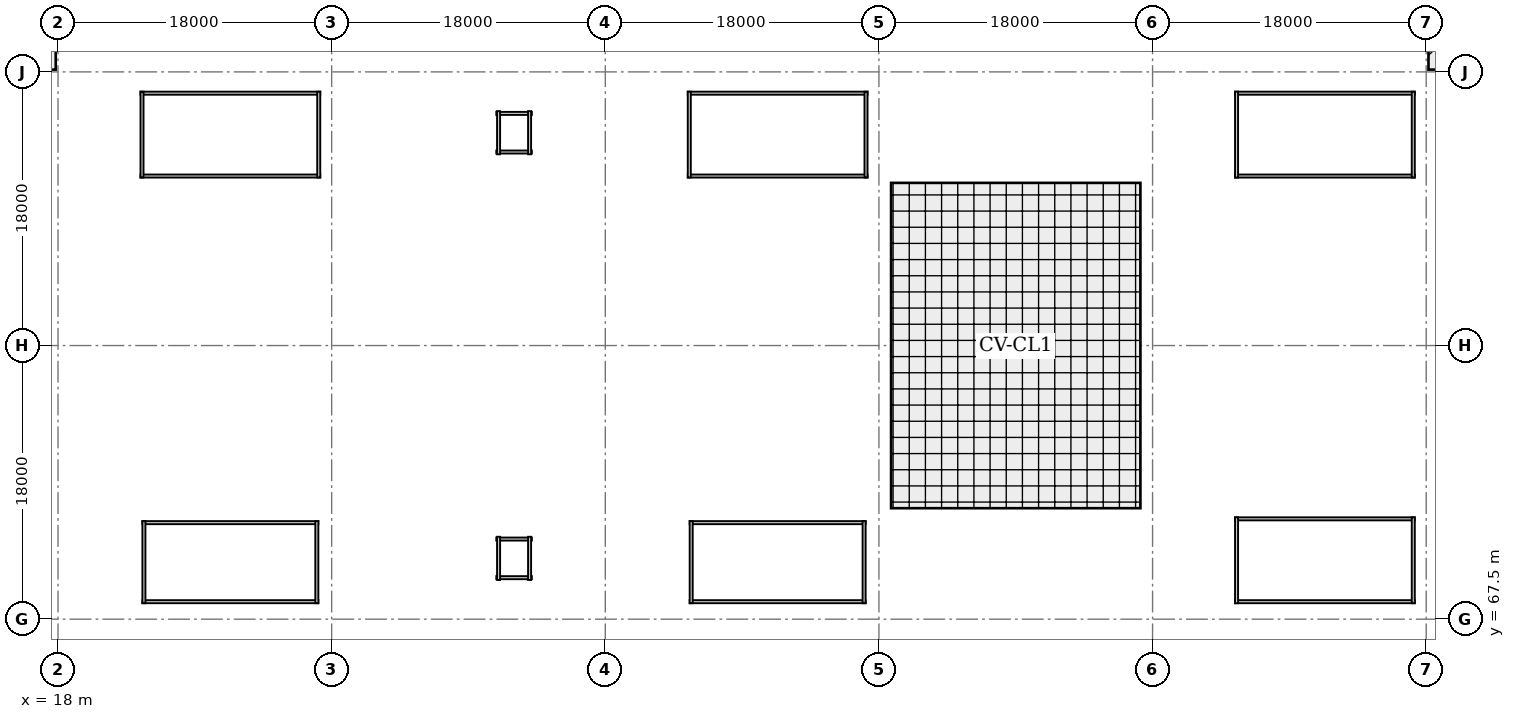
"""IFC4 building model, lengths in metres.
Left out: names, types, materials, properties, quantities, classifications, styles, units other than length and angle.
Written with IfcOpenShell. Run it as: python <this file> out.ifc"""

import sys

from ifc_helpers import new_model, si_unit, direction, frame, frame_2d, origin, origin_2d, place, context, subcontext, project, spatial, rectangle, i_section, extrude, element, fill, save


model = new_model("IFC4")
c1 = context("Model", 3, precision=1e-05, world=origin(), true_north=direction((0.0, 1.0)))
c2 = subcontext(c1, "Body", "Model", "MODEL_VIEW")
j1 = project(units=[si_unit("LENGTHUNIT", "METRE"), si_unit("PLANEANGLEUNIT", "RADIAN")], contexts=[c1])
p1 = place(None, origin())
s1 = spatial("IfcSite", under=j1, at=p1, CompositionType="ELEMENT")
p2 = place(p1, origin())
s2 = spatial("IfcBuilding", under=s1, at=p2, CompositionType="ELEMENT")
p3 = place(p2, frame((0.0, 0.0, 6.6)))
s3 = spatial("IfcBuildingStorey", under=s2, at=p3, CompositionType="ELEMENT", Elevation=6.6)
for number, where, z_axis, x_axis in (
    (1, (18.0, 67.5, 0.0), (0.0, 0.0, 1.0), (1.0, 0.0, 0.0)),
    (2, (18.0, 103.5, 0.0), (0.0, 0.0, 1.0), (1.0, 0.0, 0.0)),
    (3, (36.0, 67.5, 0.0), (0.0, 0.0, 1.0), (1.0, 0.0, 0.0)),
    (4, (36.0, 103.5, 0.0), (0.0, 0.0, 1.0), (1.0, 0.0, 0.0)),
    (5, (54.0, 67.5, 0.0), (0.0, 0.0, 1.0), (1.0, 0.0, 0.0)),
    (6, (54.0, 103.5, 0.0), (0.0, 0.0, 1.0), (1.0, 0.0, 0.0)),
    (7, (72.0, 67.5, 0.0), (0.0, 0.0, 1.0), (1.0, 0.0, 0.0)),
    (8, (72.0, 103.5, 0.0), (0.0, 0.0, 1.0), (1.0, 0.0, 0.0)),
    (9, (90.0, 67.5, 0.0), (0.0, 0.0, 1.0), (1.0, 0.0, 0.0)),
    (10, (90.0, 103.5, 0.0), (0.0, 0.0, 1.0), (1.0, 0.0, 0.0)),
    (11, (108.0, 67.5, 0.0), (0.0, 0.0, 1.0), (1.0, 0.0, 0.0)),
    (12, (108.0, 103.5, 0.0), (0.0, 0.0, 1.0), (1.0, 0.0, 0.0)),
):
    element("IfcColumn", number, at=place(p3, frame(where, z_axis=z_axis, x_axis=x_axis)), inside=s3, PredefinedType="COLUMN", context=c2, shape_type="SweptSolid", body=[
        extrude(rectangle(XDim=1.4, YDim=1.1, at=origin_2d()), origin(), (0.0, 0.0, 1.0), 4.2),
    ])
for number, where, z_axis, x_axis in (
    (13, (18.0, 76.5, -0.68), (0.0, 0.0, 1.0), (1.0, 0.0, 0.0)),
    (14, (18.0, 85.5, -0.68), (0.0, 0.0, 1.0), (1.0, 0.0, 0.0)),
    (15, (18.0, 94.5, -0.68), (0.0, 0.0, 1.0), (1.0, 0.0, 0.0)),
    (16, (36.0, 76.5, -0.68), (0.0, 0.0, 1.0), (1.0, 0.0, 0.0)),
    (17, (36.0, 85.5, -0.68), (0.0, 0.0, 1.0), (1.0, 0.0, 0.0)),
    (18, (36.0, 94.5, -0.68), (0.0, 0.0, 1.0), (1.0, 0.0, 0.0)),
    (19, (54.0, 76.5, -0.68), (0.0, 0.0, 1.0), (1.0, 0.0, 0.0)),
    (20, (54.0, 85.5, -0.68), (0.0, 0.0, 1.0), (1.0, 0.0, 0.0)),
    (21, (54.0, 94.5, -0.68), (0.0, 0.0, 1.0), (1.0, 0.0, 0.0)),
    (22, (72.0, 76.5, -0.68), (0.0, 0.0, 1.0), (1.0, 0.0, 0.0)),
    (23, (72.0, 85.5, -0.68), (0.0, 0.0, 1.0), (1.0, 0.0, 0.0)),
    (24, (72.0, 94.5, -0.68), (0.0, 0.0, 1.0), (1.0, 0.0, 0.0)),
    (25, (90.0, 76.5, -0.68), (0.0, 0.0, 1.0), (1.0, 0.0, 0.0)),
    (26, (90.0, 85.5, -0.68), (0.0, 0.0, 1.0), (1.0, 0.0, 0.0)),
    (27, (90.0, 94.5, -0.68), (0.0, 0.0, 1.0), (1.0, 0.0, 0.0)),
    (28, (108.0, 76.5, -0.68), (0.0, 0.0, 1.0), (1.0, 0.0, 0.0)),
    (29, (108.0, 85.5, -0.68), (0.0, 0.0, 1.0), (1.0, 0.0, 0.0)),
    (30, (108.0, 94.5, -0.68), (0.0, 0.0, 1.0), (1.0, 0.0, 0.0)),
):
    element("IfcColumn", number, at=place(p3, frame(where, z_axis=z_axis, x_axis=x_axis)), inside=s3, PredefinedType="COLUMN", context=c2, shape_type="SweptSolid", body=[
        extrude(i_section(OverallWidth=0.4, OverallDepth=0.408, WebThickness=0.021, FlangeThickness=0.021, FilletRadius=0.022, at=origin_2d()), origin(), (0.0, 0.0, 1.0), 4.03),
    ])
for number, where, z_axis, x_axis in (
    (31, (23.55, 68.65, 0.0), (0.0, 0.0, 1.0), (1.0, 0.0, 0.0)),
    (32, (35.125, 73.85, 0.0), (0.0, 0.0, 1.0), (-1.0, 0.0, 0.0)),
):
    element("IfcWall", number, at=place(p3, frame(where, z_axis=z_axis, x_axis=x_axis)), inside=s3, PredefinedType="SOLIDWALL", context=c2, shape_type="SweptSolid", body=[
        extrude(rectangle(XDim=11.575, YDim=0.2, at=frame_2d((5.788, 0.0))), origin(), (0.0, 0.0, 1.0), 2.45),
    ])
p4 = place(p3, frame((35.025, 68.55, 0.0), z_axis=(0.0, 0.0, 1.0), x_axis=(0.0, 1.0, 0.0)))
e33 = element("IfcWall", 33, at=p4, inside=s3, PredefinedType="SOLIDWALL", context=c2, shape_type="SweptSolid", body=[
    extrude(rectangle(XDim=5.4, YDim=0.2, at=frame_2d((2.7, 0.0))), origin(), (0.0, 0.0, 1.0), 2.45),
])
p5 = place(p3, frame((23.65, 73.95, 0.0), z_axis=(0.0, 0.0, 1.0), x_axis=(0.0, -1.0, 0.0)))
e34 = element("IfcWall", 34, at=p5, inside=s3, PredefinedType="SOLIDWALL", context=c2, shape_type="SweptSolid", body=[
    extrude(rectangle(XDim=5.4, YDim=0.2, at=frame_2d((2.7, 0.0))), origin(), (0.0, 0.0, 1.0), 2.45),
])
p6 = place(p5, frame((1.9, 0.0, 0.0)))
e35 = element("IfcOpeningElement", 35, at=p6, cuts=e34, PredefinedType="OPENING", context=c2, shape_type="SweptSolid", body=[
    extrude(rectangle(XDim=1.6, YDim=2.15, at=frame_2d((0.8, 1.075))), frame((0.0, 0.11, 0.0), z_axis=(0.0, -1.0, 0.0), x_axis=(1.0, 0.0, 0.0)), (0.0, 0.0, 1.0), 0.22),
])
for number, where, z_axis, x_axis in (
    (36, (59.55, 68.65, 0.0), (0.0, 0.0, 1.0), (1.0, 0.0, 0.0)),
    (37, (71.125, 73.85, 0.0), (0.0, 0.0, 1.0), (-1.0, 0.0, 0.0)),
):
    element("IfcWall", number, at=place(p3, frame(where, z_axis=z_axis, x_axis=x_axis)), inside=s3, PredefinedType="SOLIDWALL", context=c2, shape_type="SweptSolid", body=[
        extrude(rectangle(XDim=11.575, YDim=0.2, at=frame_2d((5.788, 0.0))), origin(), (0.0, 0.0, 1.0), 2.45),
    ])
p7 = place(p3, frame((71.025, 68.55, 0.0), z_axis=(0.0, 0.0, 1.0), x_axis=(0.0, 1.0, 0.0)))
e38 = element("IfcWall", 38, at=p7, inside=s3, PredefinedType="SOLIDWALL", context=c2, shape_type="SweptSolid", body=[
    extrude(rectangle(XDim=5.4, YDim=0.2, at=frame_2d((2.7, 0.0))), origin(), (0.0, 0.0, 1.0), 2.45),
])
p8 = place(p3, frame((59.65, 73.95, 0.0), z_axis=(0.0, 0.0, 1.0), x_axis=(0.0, -1.0, 0.0)))
e39 = element("IfcWall", 39, at=p8, inside=s3, PredefinedType="SOLIDWALL", context=c2, shape_type="SweptSolid", body=[
    extrude(rectangle(XDim=5.4, YDim=0.2, at=frame_2d((2.7, 0.0))), origin(), (0.0, 0.0, 1.0), 2.45),
])
p9 = place(p8, frame((1.9, 0.0, 0.0)))
e40 = element("IfcOpeningElement", 40, at=p9, cuts=e39, PredefinedType="OPENING", context=c2, shape_type="SweptSolid", body=[
    extrude(rectangle(XDim=1.6, YDim=2.15, at=frame_2d((0.8, 1.075))), frame((0.0, 0.11, 0.0), z_axis=(0.0, -1.0, 0.0), x_axis=(1.0, 0.0, 0.0)), (0.0, 0.0, 1.0), 0.22),
])
for number, where, z_axis, x_axis in (
    (41, (95.425, 68.65, 0.0), (0.0, 0.0, 1.0), (1.0, 0.0, 0.0)),
    (42, (107.25, 74.1, 0.0), (0.0, 0.0, 1.0), (-1.0, 0.0, 0.0)),
):
    element("IfcWall", number, at=place(p3, frame(where, z_axis=z_axis, x_axis=x_axis)), inside=s3, PredefinedType="SOLIDWALL", context=c2, shape_type="SweptSolid", body=[
        extrude(rectangle(XDim=11.825, YDim=0.2, at=frame_2d((5.913, 0.0))), origin(), (0.0, 0.0, 1.0), 2.45),
    ])
p10 = place(p3, frame((107.15, 68.55, 0.0), z_axis=(0.0, 0.0, 1.0), x_axis=(0.0, 1.0, 0.0)))
e43 = element("IfcWall", 43, at=p10, inside=s3, PredefinedType="SOLIDWALL", context=c2, shape_type="SweptSolid", body=[
    extrude(rectangle(XDim=5.65, YDim=0.2, at=frame_2d((2.825, 0.0))), origin(), (0.0, 0.0, 1.0), 2.45),
])
p11 = place(p3, frame((95.525, 74.2, 0.0), z_axis=(0.0, 0.0, 1.0), x_axis=(0.0, -1.0, 0.0)))
e44 = element("IfcWall", 44, at=p11, inside=s3, PredefinedType="SOLIDWALL", context=c2, shape_type="SweptSolid", body=[
    extrude(rectangle(XDim=5.65, YDim=0.2, at=frame_2d((2.825, 0.0))), origin(), (0.0, 0.0, 1.0), 2.45),
])
p12 = place(p11, frame((2.025, 0.0, 0.0)))
e45 = element("IfcOpeningElement", 45, at=p12, cuts=e44, PredefinedType="OPENING", context=c2, shape_type="SweptSolid", body=[
    extrude(rectangle(XDim=1.6, YDim=2.15, at=frame_2d((0.8, 1.075))), frame((0.0, 0.11, 0.0), z_axis=(0.0, -1.0, 0.0), x_axis=(1.0, 0.0, 0.0)), (0.0, 0.0, 1.0), 0.22),
])
for number, where, z_axis, x_axis in (
    (46, (23.425, 96.65, 0.0), (0.0, 0.0, 1.0), (1.0, 0.0, 0.0)),
    (47, (35.25, 102.1, 0.0), (0.0, 0.0, 1.0), (-1.0, 0.0, 0.0)),
):
    element("IfcWall", number, at=place(p3, frame(where, z_axis=z_axis, x_axis=x_axis)), inside=s3, PredefinedType="SOLIDWALL", context=c2, shape_type="SweptSolid", body=[
        extrude(rectangle(XDim=11.825, YDim=0.2, at=frame_2d((5.913, 0.0))), origin(), (0.0, 0.0, 1.0), 2.45),
    ])
p13 = place(p3, frame((35.15, 96.55, 0.0), z_axis=(0.0, 0.0, 1.0), x_axis=(0.0, 1.0, 0.0)))
e48 = element("IfcWall", 48, at=p13, inside=s3, PredefinedType="SOLIDWALL", context=c2, shape_type="SweptSolid", body=[
    extrude(rectangle(XDim=5.65, YDim=0.2, at=frame_2d((2.825, 0.0))), origin(), (0.0, 0.0, 1.0), 2.45),
])
p14 = place(p3, frame((23.525, 102.2, 0.0), z_axis=(0.0, 0.0, 1.0), x_axis=(0.0, -1.0, 0.0)))
e49 = element("IfcWall", 49, at=p14, inside=s3, PredefinedType="SOLIDWALL", context=c2, shape_type="SweptSolid", body=[
    extrude(rectangle(XDim=5.65, YDim=0.2, at=frame_2d((2.825, 0.0))), origin(), (0.0, 0.0, 1.0), 2.45),
])
p15 = place(p14, frame((2.025, 0.0, 0.0)))
e50 = element("IfcOpeningElement", 50, at=p15, cuts=e49, PredefinedType="OPENING", context=c2, shape_type="SweptSolid", body=[
    extrude(rectangle(XDim=1.6, YDim=2.15, at=frame_2d((0.8, 1.075))), frame((0.0, 0.11, 0.0), z_axis=(0.0, -1.0, 0.0), x_axis=(1.0, 0.0, 0.0)), (0.0, 0.0, 1.0), 0.22),
])
for number, where, z_axis, x_axis in (
    (51, (59.425, 96.65, 0.0), (0.0, 0.0, 1.0), (1.0, 0.0, 0.0)),
    (52, (71.25, 102.1, 0.0), (0.0, 0.0, 1.0), (-1.0, 0.0, 0.0)),
):
    element("IfcWall", number, at=place(p3, frame(where, z_axis=z_axis, x_axis=x_axis)), inside=s3, PredefinedType="SOLIDWALL", context=c2, shape_type="SweptSolid", body=[
        extrude(rectangle(XDim=11.825, YDim=0.2, at=frame_2d((5.913, 0.0))), origin(), (0.0, 0.0, 1.0), 2.45),
    ])
p16 = place(p3, frame((71.15, 96.55, 0.0), z_axis=(0.0, 0.0, 1.0), x_axis=(0.0, 1.0, 0.0)))
e53 = element("IfcWall", 53, at=p16, inside=s3, PredefinedType="SOLIDWALL", context=c2, shape_type="SweptSolid", body=[
    extrude(rectangle(XDim=5.65, YDim=0.2, at=frame_2d((2.825, 0.0))), origin(), (0.0, 0.0, 1.0), 2.45),
])
p17 = place(p3, frame((59.525, 102.2, 0.0), z_axis=(0.0, 0.0, 1.0), x_axis=(0.0, -1.0, 0.0)))
e54 = element("IfcWall", 54, at=p17, inside=s3, PredefinedType="SOLIDWALL", context=c2, shape_type="SweptSolid", body=[
    extrude(rectangle(XDim=5.65, YDim=0.2, at=frame_2d((2.825, 0.0))), origin(), (0.0, 0.0, 1.0), 2.45),
])
p18 = place(p17, frame((2.025, 0.0, 0.0)))
e55 = element("IfcOpeningElement", 55, at=p18, cuts=e54, PredefinedType="OPENING", context=c2, shape_type="SweptSolid", body=[
    extrude(rectangle(XDim=1.6, YDim=2.15, at=frame_2d((0.8, 1.075))), frame((0.0, 0.11, 0.0), z_axis=(0.0, -1.0, 0.0), x_axis=(1.0, 0.0, 0.0)), (0.0, 0.0, 1.0), 0.22),
])
for number, where, z_axis, x_axis in (
    (56, (95.425, 96.65, 0.0), (0.0, 0.0, 1.0), (1.0, 0.0, 0.0)),
    (57, (107.25, 102.1, 0.0), (0.0, 0.0, 1.0), (-1.0, 0.0, 0.0)),
):
    element("IfcWall", number, at=place(p3, frame(where, z_axis=z_axis, x_axis=x_axis)), inside=s3, PredefinedType="SOLIDWALL", context=c2, shape_type="SweptSolid", body=[
        extrude(rectangle(XDim=11.825, YDim=0.2, at=frame_2d((5.913, 0.0))), origin(), (0.0, 0.0, 1.0), 2.45),
    ])
p19 = place(p3, frame((107.15, 96.55, 0.0), z_axis=(0.0, 0.0, 1.0), x_axis=(0.0, 1.0, 0.0)))
e58 = element("IfcWall", 58, at=p19, inside=s3, PredefinedType="SOLIDWALL", context=c2, shape_type="SweptSolid", body=[
    extrude(rectangle(XDim=5.65, YDim=0.2, at=frame_2d((2.825, 0.0))), origin(), (0.0, 0.0, 1.0), 2.45),
])
p20 = place(p3, frame((95.525, 102.2, 0.0), z_axis=(0.0, 0.0, 1.0), x_axis=(0.0, -1.0, 0.0)))
e59 = element("IfcWall", 59, at=p20, inside=s3, PredefinedType="SOLIDWALL", context=c2, shape_type="SweptSolid", body=[
    extrude(rectangle(XDim=5.65, YDim=0.2, at=frame_2d((2.825, 0.0))), origin(), (0.0, 0.0, 1.0), 2.45),
])
p21 = place(p20, frame((2.025, 0.0, 0.0)))
e60 = element("IfcOpeningElement", 60, at=p21, cuts=e59, PredefinedType="OPENING", context=c2, shape_type="SweptSolid", body=[
    extrude(rectangle(XDim=1.6, YDim=2.15, at=frame_2d((0.8, 1.075))), frame((0.0, 0.11, 0.0), z_axis=(0.0, -1.0, 0.0), x_axis=(1.0, 0.0, 0.0)), (0.0, 0.0, 1.0), 0.22),
])
p22 = place(p3, frame((46.83, 70.23, 0.0), z_axis=(0.0, 0.0, 1.0), x_axis=(1.0, 0.0, 0.0)))
e61 = element("IfcWall", 61, at=p22, inside=s3, PredefinedType="SOLIDWALL", context=c2, shape_type="SweptSolid", body=[
    extrude(rectangle(XDim=2.34, YDim=0.2, at=frame_2d((1.17, 0.0))), origin(), (0.0, 0.0, 1.0), 3.875),
])
p23 = place(p3, frame((49.17, 72.77, 0.0), z_axis=(0.0, 0.0, 1.0), x_axis=(-1.0, 0.0, 0.0)))
e62 = element("IfcWall", 62, at=p23, inside=s3, PredefinedType="SOLIDWALL", context=c2, shape_type="SweptSolid", body=[
    extrude(rectangle(XDim=2.34, YDim=0.2, at=frame_2d((1.17, 0.0))), origin(), (0.0, 0.0, 1.0), 3.875),
])
p24 = place(p23, frame((0.62, 0.0, 0.0)))
e63 = element("IfcOpeningElement", 63, at=p24, cuts=e62, PredefinedType="OPENING", context=c2, shape_type="SweptSolid", body=[
    extrude(rectangle(XDim=1.1, YDim=2.15, at=frame_2d((0.55, 1.075))), frame((0.0, 0.11, 0.0), z_axis=(0.0, -1.0, 0.0), x_axis=(1.0, 0.0, 0.0)), (0.0, 0.0, 1.0), 0.22),
])
for number, where, z_axis, x_axis in (
    (64, (46.98, 72.92, 0.0), (0.0, 0.0, 1.0), (0.0, -1.0, 0.0)),
    (65, (49.02, 70.08, 0.0), (0.0, 0.0, 1.0), (0.0, 1.0, 0.0)),
):
    element("IfcWall", number, at=place(p3, frame(where, z_axis=z_axis, x_axis=x_axis)), inside=s3, PredefinedType="SOLIDWALL", context=c2, shape_type="SweptSolid", body=[
        extrude(rectangle(XDim=2.84, YDim=0.2, at=frame_2d((1.42, 0.0))), origin(), (0.0, 0.0, 1.0), 3.875),
    ])
p25 = place(p3, frame((46.83, 98.23, 0.0), z_axis=(0.0, 0.0, 1.0), x_axis=(1.0, 0.0, 0.0)))
e66 = element("IfcWall", 66, at=p25, inside=s3, PredefinedType="SOLIDWALL", context=c2, shape_type="SweptSolid", body=[
    extrude(rectangle(XDim=2.34, YDim=0.2, at=frame_2d((1.17, 0.0))), origin(), (0.0, 0.0, 1.0), 3.875),
])
p26 = place(p25, frame((0.62, 0.0, 0.0)))
e67 = element("IfcOpeningElement", 67, at=p26, cuts=e66, PredefinedType="OPENING", context=c2, shape_type="SweptSolid", body=[
    extrude(rectangle(XDim=1.1, YDim=2.15, at=frame_2d((0.55, 1.075))), frame((0.0, 0.11, 0.0), z_axis=(0.0, -1.0, 0.0), x_axis=(1.0, 0.0, 0.0)), (0.0, 0.0, 1.0), 0.22),
])
p27 = place(p3, frame((49.17, 100.77, 0.0), z_axis=(0.0, 0.0, 1.0), x_axis=(-1.0, 0.0, 0.0)))
e68 = element("IfcWall", 68, at=p27, inside=s3, PredefinedType="SOLIDWALL", context=c2, shape_type="SweptSolid", body=[
    extrude(rectangle(XDim=2.34, YDim=0.2, at=frame_2d((1.17, 0.0))), origin(), (0.0, 0.0, 1.0), 3.875),
])
for number, where, z_axis, x_axis in (
    (69, (46.98, 100.92, 0.0), (0.0, 0.0, 1.0), (0.0, -1.0, 0.0)),
    (70, (49.02, 98.08, 0.0), (0.0, 0.0, 1.0), (0.0, 1.0, 0.0)),
):
    element("IfcWall", number, at=place(p3, frame(where, z_axis=z_axis, x_axis=x_axis)), inside=s3, PredefinedType="SOLIDWALL", context=c2, shape_type="SweptSolid", body=[
        extrude(rectangle(XDim=2.84, YDim=0.2, at=frame_2d((1.42, 0.0))), origin(), (0.0, 0.0, 1.0), 3.875),
    ])
p28 = place(p6, origin())
e71 = element("IfcDoor", 71, at=p28, inside=s3, OperationType="SINGLE_SWING_LEFT", PredefinedType="DOOR", context=c2, shape_type="SweptSolid", body=[
    extrude(rectangle(XDim=1.6, YDim=2.15, at=frame_2d((0.8, 1.075))), frame((0.0, 0.025, 0.0), z_axis=(0.0, -1.0, 0.0), x_axis=(1.0, 0.0, 0.0)), (0.0, 0.0, 1.0), 0.05),
])
fill(e35, e71)
p29 = place(p9, origin())
e72 = element("IfcDoor", 72, at=p29, inside=s3, OperationType="SINGLE_SWING_LEFT", PredefinedType="DOOR", context=c2, shape_type="SweptSolid", body=[
    extrude(rectangle(XDim=1.6, YDim=2.15, at=frame_2d((0.8, 1.075))), frame((0.0, 0.025, 0.0), z_axis=(0.0, -1.0, 0.0), x_axis=(1.0, 0.0, 0.0)), (0.0, 0.0, 1.0), 0.05),
])
fill(e40, e72)
p30 = place(p12, origin())
e73 = element("IfcDoor", 73, at=p30, inside=s3, OperationType="SINGLE_SWING_LEFT", PredefinedType="DOOR", context=c2, shape_type="SweptSolid", body=[
    extrude(rectangle(XDim=1.6, YDim=2.15, at=frame_2d((0.8, 1.075))), frame((0.0, 0.025, 0.0), z_axis=(0.0, -1.0, 0.0), x_axis=(1.0, 0.0, 0.0)), (0.0, 0.0, 1.0), 0.05),
])
fill(e45, e73)
p31 = place(p15, origin())
e74 = element("IfcDoor", 74, at=p31, inside=s3, OperationType="SINGLE_SWING_LEFT", PredefinedType="DOOR", context=c2, shape_type="SweptSolid", body=[
    extrude(rectangle(XDim=1.6, YDim=2.15, at=frame_2d((0.8, 1.075))), frame((0.0, 0.025, 0.0), z_axis=(0.0, -1.0, 0.0), x_axis=(1.0, 0.0, 0.0)), (0.0, 0.0, 1.0), 0.05),
])
fill(e50, e74)
p32 = place(p18, origin())
e75 = element("IfcDoor", 75, at=p32, inside=s3, OperationType="SINGLE_SWING_LEFT", PredefinedType="DOOR", context=c2, shape_type="SweptSolid", body=[
    extrude(rectangle(XDim=1.6, YDim=2.15, at=frame_2d((0.8, 1.075))), frame((0.0, 0.025, 0.0), z_axis=(0.0, -1.0, 0.0), x_axis=(1.0, 0.0, 0.0)), (0.0, 0.0, 1.0), 0.05),
])
fill(e55, e75)
p33 = place(p21, origin())
e76 = element("IfcDoor", 76, at=p33, inside=s3, OperationType="SINGLE_SWING_LEFT", PredefinedType="DOOR", context=c2, shape_type="SweptSolid", body=[
    extrude(rectangle(XDim=1.6, YDim=2.15, at=frame_2d((0.8, 1.075))), frame((0.0, 0.025, 0.0), z_axis=(0.0, -1.0, 0.0), x_axis=(1.0, 0.0, 0.0)), (0.0, 0.0, 1.0), 0.05),
])
fill(e60, e76)
p34 = place(p24, origin())
e77 = element("IfcDoor", 77, at=p34, inside=s3, OperationType="SLIDING_TO_LEFT", PredefinedType="DOOR", context=c2, shape_type="SweptSolid", body=[
    extrude(rectangle(XDim=1.1, YDim=2.15, at=frame_2d((0.55, 1.075))), frame((0.0, 0.025, 0.0), z_axis=(0.0, -1.0, 0.0), x_axis=(1.0, 0.0, 0.0)), (0.0, 0.0, 1.0), 0.05),
])
fill(e63, e77)
p35 = place(p26, origin())
e78 = element("IfcDoor", 78, at=p35, inside=s3, OperationType="SLIDING_TO_LEFT", PredefinedType="DOOR", context=c2, shape_type="SweptSolid", body=[
    extrude(rectangle(XDim=1.1, YDim=2.15, at=frame_2d((0.55, 1.075))), frame((0.0, 0.025, 0.0), z_axis=(0.0, -1.0, 0.0), x_axis=(1.0, 0.0, 0.0)), (0.0, 0.0, 1.0), 0.05),
])
fill(e67, e78)
save(model, sys.argv[1])
